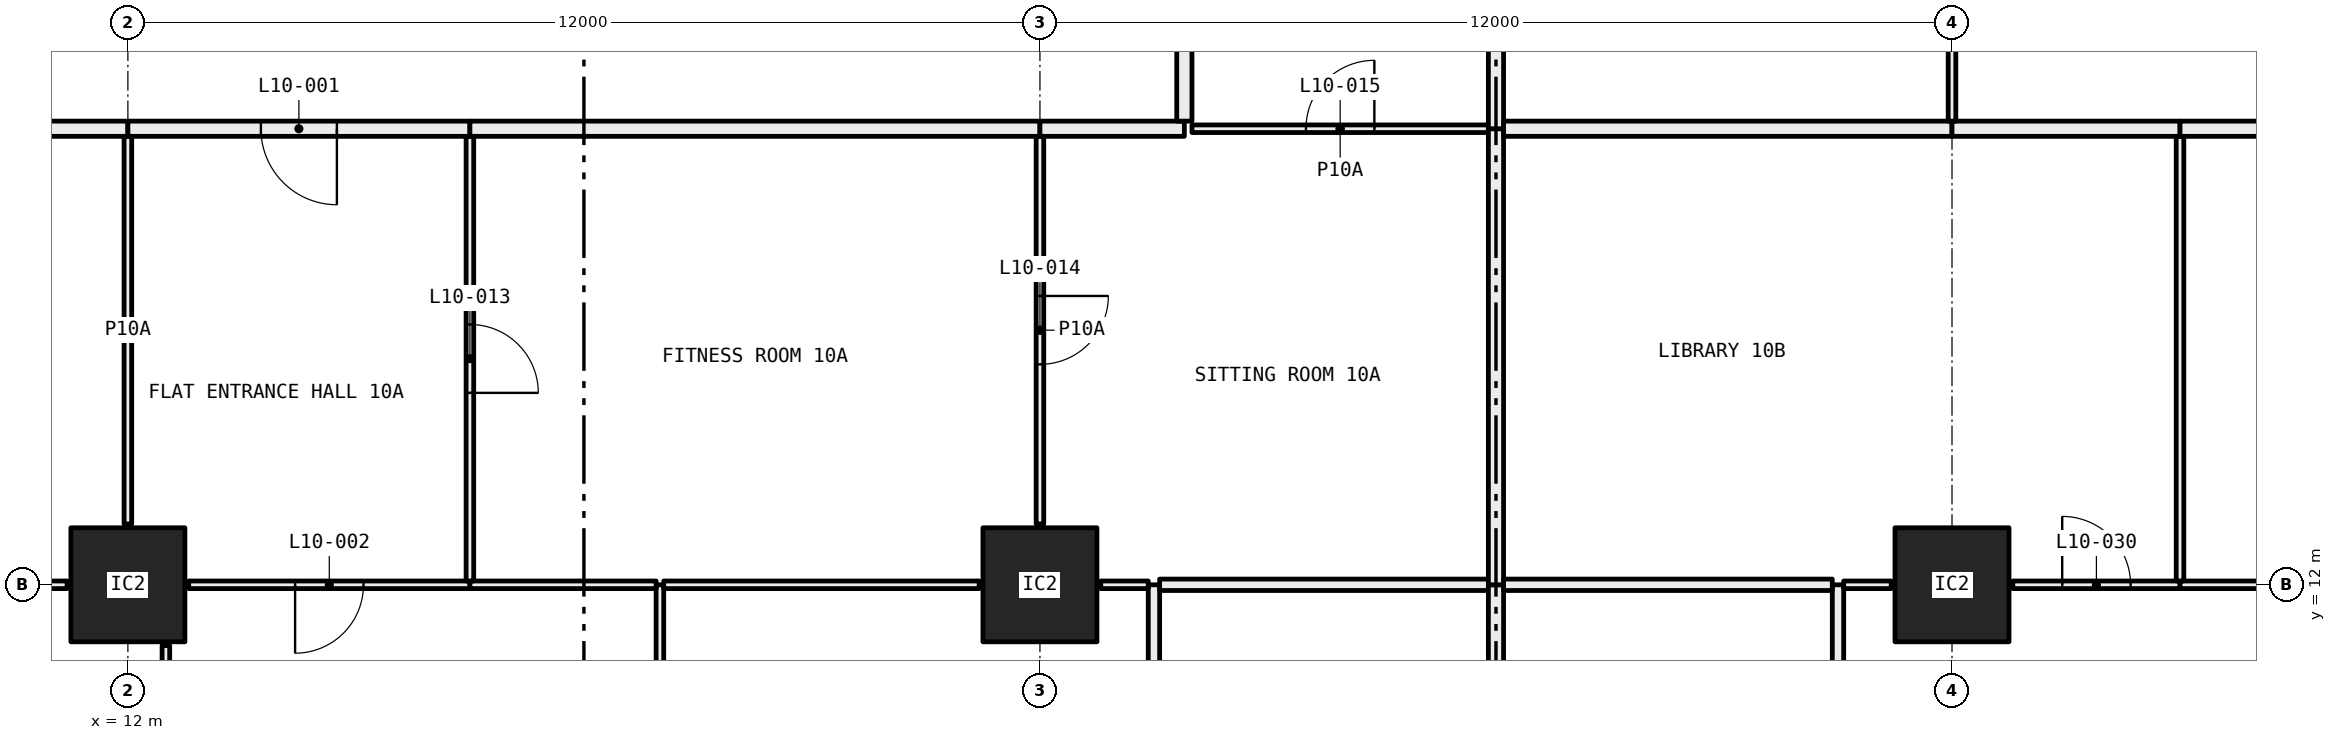
"""IFC4 building model, lengths in metres.
Left out: names, types, materials, properties, quantities, classifications, styles, units other than length and angle.
Written with IfcOpenShell. Run it as: python <this file> out.ifc"""

import sys

from ifc_helpers import new_model, si_unit, direction, frame, frame_2d, origin, origin_2d, place, context, subcontext, project, spatial, rectangle, hollow_rectangle, extrude, element, fill, save


model = new_model("IFC4")
c1 = context("Model", 3, precision=1e-05, world=origin(), true_north=direction((0.0, 1.0)))
c2 = subcontext(c1, "Body", "Model", "MODEL_VIEW")
j1 = project(units=[si_unit("LENGTHUNIT", "METRE"), si_unit("PLANEANGLEUNIT", "RADIAN")], contexts=[c1])
p1 = place(None, origin())
s1 = spatial("IfcSite", under=j1, at=p1, CompositionType="ELEMENT")
p2 = place(p1, origin())
s2 = spatial("IfcBuilding", under=s1, at=p2, CompositionType="ELEMENT")
p3 = place(p2, frame((0.0, 0.0, 47.25)))
s3 = spatial("IfcBuildingStorey", under=s2, at=p3, CompositionType="ELEMENT", Elevation=47.25)
for number, where, z_axis, x_axis in (
    (1, (12.0, 12.0, 0.0), (0.0, 0.0, 1.0), (1.0, 0.0, 0.0)),
    (2, (24.0, 12.0, 0.0), (0.0, 0.0, 1.0), (1.0, 0.0, 0.0)),
    (3, (36.0, 12.0, 0.0), (0.0, 0.0, 1.0), (1.0, 0.0, 0.0)),
):
    element("IfcColumn", number, at=place(p3, frame(where, z_axis=z_axis, x_axis=x_axis)), inside=s3, PredefinedType="COLUMN", context=c2, shape_type="SweptSolid", body=[
        extrude(hollow_rectangle(XDim=1.5, YDim=1.5, WallThickness=0.065, at=origin_2d()), origin(), (0.0, 0.0, 1.0), 3.05),
    ])
p4 = place(p3, frame((12.5, 6.05, 0.0), z_axis=(0.0, 0.0, 1.0), x_axis=(0.0, 1.0, 0.0)))
e4 = element("IfcWall", 4, at=p4, inside=s3, PredefinedType="PARTITIONING", context=c2, shape_type="SweptSolid", body=[
    extrude(rectangle(XDim=5.15, YDim=0.1, at=frame_2d((2.575, 0.0))), origin(), (0.0, 0.0, 1.0), 3.05),
])
p5 = place(p4, frame((2.125, 0.0, 0.0)))
e5 = element("IfcOpeningElement", 5, at=p5, cuts=e4, PredefinedType="OPENING", context=c2, shape_type="SweptSolid", body=[
    extrude(rectangle(XDim=0.9, YDim=2.1, at=frame_2d((0.45, 1.05))), frame((0.0, 0.06, 0.0), z_axis=(0.0, -1.0, 0.0), x_axis=(1.0, 0.0, 0.0)), (0.0, 0.0, 1.0), 0.12),
])
p6 = place(p3, frame((11.2, 12.0, 0.0), z_axis=(0.0, 0.0, 1.0), x_axis=(-1.0, 0.0, 0.0)))
e6 = element("IfcWall", 6, at=p6, inside=s3, PredefinedType="PARTITIONING", context=c2, shape_type="SweptSolid", body=[
    extrude(rectangle(XDim=5.15, YDim=0.1, at=frame_2d((2.575, 0.0))), origin(), (0.0, 0.0, 1.0), 2.45),
])
p7 = place(p6, frame((2.125, 0.0, 0.0)))
e7 = element("IfcOpeningElement", 7, at=p7, cuts=e6, PredefinedType="OPENING", context=c2, shape_type="SweptSolid", body=[
    extrude(rectangle(XDim=0.9, YDim=2.1, at=frame_2d((0.45, 1.05))), frame((0.0, 0.06, 0.0), z_axis=(0.0, -1.0, 0.0), x_axis=(1.0, 0.0, 0.0)), (0.0, 0.0, 1.0), 0.12),
])
p8 = place(p3, frame((19.0, 6.05, 0.0), z_axis=(0.0, 0.0, 1.0), x_axis=(0.0, 1.0, 0.0)))
e8 = element("IfcWall", 8, at=p8, inside=s3, PredefinedType="PARTITIONING", context=c2, shape_type="SweptSolid", body=[
    extrude(rectangle(XDim=5.95, YDim=0.1, at=frame_2d((2.975, 0.0))), origin(), (0.0, 0.0, 1.0), 2.45),
])
p9 = place(p8, frame((2.525, 0.0, 0.0)))
e9 = element("IfcOpeningElement", 9, at=p9, cuts=e8, PredefinedType="OPENING", context=c2, shape_type="SweptSolid", body=[
    extrude(rectangle(XDim=0.9, YDim=2.1, at=frame_2d((0.45, 1.05))), frame((0.0, 0.06, 0.0), z_axis=(0.0, -1.0, 0.0), x_axis=(1.0, 0.0, 0.0)), (0.0, 0.0, 1.0), 0.12),
])
p10 = place(p3, frame((16.5, 12.0, 0.0), z_axis=(0.0, 0.0, 1.0), x_axis=(-1.0, 0.0, 0.0)))
e10 = element("IfcWall", 10, at=p10, inside=s3, PredefinedType="PARTITIONING", context=c2, shape_type="SweptSolid", body=[
    extrude(rectangle(XDim=3.7, YDim=0.1, at=frame_2d((1.85, 0.0))), origin(), (0.0, 0.0, 1.0), 2.45),
])
p11 = place(p10, frame((1.4, 0.0, 0.0)))
e11 = element("IfcOpeningElement", 11, at=p11, cuts=e10, PredefinedType="OPENING", context=c2, shape_type="SweptSolid", body=[
    extrude(rectangle(XDim=0.9, YDim=2.1, at=frame_2d((0.45, 1.05))), frame((0.0, 0.06, 0.0), z_axis=(0.0, -1.0, 0.0), x_axis=(1.0, 0.0, 0.0)), (0.0, 0.0, 1.0), 0.12),
])
p12 = place(p3, frame((18.95, 12.0, 0.0), z_axis=(0.0, 0.0, 1.0), x_axis=(-1.0, 0.0, 0.0)))
e12 = element("IfcWall", 12, at=p12, inside=s3, PredefinedType="PARTITIONING", context=c2, shape_type="SweptSolid", body=[
    extrude(rectangle(XDim=2.45, YDim=0.1, at=frame_2d((1.225, 0.0))), origin(), (0.0, 0.0, 1.0), 2.45),
])
p13 = place(p3, frame((25.5, 9.0, 0.0), z_axis=(0.0, 0.0, 1.0), x_axis=(0.0, 1.0, 0.0)))
e13 = element("IfcWall", 13, at=p13, inside=s3, PredefinedType="PARTITIONING", context=c2, shape_type="SweptSolid", body=[
    extrude(rectangle(XDim=3.0, YDim=0.15, at=frame_2d((1.5, 0.0))), origin(), (0.0, 0.0, 1.0), 2.45),
])
p14 = place(p13, frame((1.05, 0.0, 0.0)))
e14 = element("IfcOpeningElement", 14, at=p14, cuts=e13, PredefinedType="OPENING", context=c2, shape_type="SweptSolid", body=[
    extrude(rectangle(XDim=0.9, YDim=2.1, at=frame_2d((0.45, 1.05))), frame((0.0, 0.085, 0.0), z_axis=(0.0, -1.0, 0.0), x_axis=(1.0, 0.0, 0.0)), (0.0, 0.0, 1.0), 0.17),
])
p15 = place(p3, frame((23.2, 12.0, 0.0), z_axis=(0.0, 0.0, 1.0), x_axis=(-1.0, 0.0, 0.0)))
e15 = element("IfcWall", 15, at=p15, inside=s3, PredefinedType="PARTITIONING", context=c2, shape_type="SweptSolid", body=[
    extrude(rectangle(XDim=4.15, YDim=0.1, at=frame_2d((2.075, 0.0))), origin(), (0.0, 0.0, 1.0), 2.45),
])
p16 = place(p3, frame((25.425, 12.0, 0.0), z_axis=(0.0, 0.0, 1.0), x_axis=(-1.0, 0.0, 0.0)))
e16 = element("IfcWall", 16, at=p16, inside=s3, PredefinedType="PARTITIONING", context=c2, shape_type="SweptSolid", body=[
    extrude(rectangle(XDim=0.625, YDim=0.1, at=frame_2d((0.312, 0.0))), origin(), (0.0, 0.0, 1.0), 2.45),
])
p17 = place(p3, frame((29.9, 12.0, 0.0), z_axis=(0.0, 0.0, 1.0), x_axis=(-1.0, 0.0, 0.0)))
e17 = element("IfcWall", 17, at=p17, inside=s3, PredefinedType="PARTITIONING", context=c2, shape_type="SweptSolid", body=[
    extrude(rectangle(XDim=4.325, YDim=0.15, at=frame_2d((2.163, 0.0))), origin(), (0.0, 0.0, 1.0), 2.45),
])
p18 = place(p3, frame((30.0, 9.0, 0.0), z_axis=(0.0, 0.0, 1.0), x_axis=(0.0, 1.0, 0.0)))
e18 = element("IfcWall", 18, at=p18, inside=s3, PredefinedType="PARTITIONING", context=c2, shape_type="SweptSolid", body=[
    extrude(rectangle(XDim=3.0, YDim=0.2, at=frame_2d((1.5, 0.0))), origin(), (0.0, 0.0, 1.0), 2.45),
])
p19 = place(p3, frame((12.0, 12.8, 0.0), z_axis=(0.0, 0.0, 1.0), x_axis=(0.0, 1.0, 0.0)))
e19 = element("IfcWall", 19, at=p19, inside=s3, PredefinedType="PARTITIONING", context=c2, shape_type="SweptSolid", body=[
    extrude(rectangle(XDim=5.1, YDim=0.1, at=frame_2d((2.55, 0.0))), origin(), (0.0, 0.0, 1.0), 3.05),
])
p20 = place(p3, frame((12.0, 18.0, 0.0), z_axis=(0.0, 0.0, 1.0), x_axis=(-1.0, 0.0, 0.0)))
e20 = element("IfcWall", 20, at=p20, inside=s3, PredefinedType="PARTITIONING", context=c2, shape_type="SweptSolid", body=[
    extrude(rectangle(XDim=1.9, YDim=0.2, at=frame_2d((0.95, 0.0))), origin(), (0.0, 0.0, 1.0), 3.05),
])
p21 = place(p3, frame((16.5, 12.05, 0.0), z_axis=(0.0, 0.0, 1.0), x_axis=(0.0, 1.0, 0.0)))
e21 = element("IfcWall", 21, at=p21, inside=s3, PredefinedType="PARTITIONING", context=c2, shape_type="SweptSolid", body=[
    extrude(rectangle(XDim=5.85, YDim=0.1, at=frame_2d((2.925, 0.0))), origin(), (0.0, 0.0, 1.0), 2.45),
])
p22 = place(p21, frame((2.475, 0.0, 0.0)))
e22 = element("IfcOpeningElement", 22, at=p22, cuts=e21, PredefinedType="OPENING", context=c2, shape_type="SweptSolid", body=[
    extrude(rectangle(XDim=0.9, YDim=2.1, at=frame_2d((0.45, 1.05))), frame((0.0, 0.06, 0.0), z_axis=(0.0, -1.0, 0.0), x_axis=(1.0, 0.0, 0.0)), (0.0, 0.0, 1.0), 0.12),
])
p23 = place(p3, frame((16.5, 18.0, 0.0), z_axis=(0.0, 0.0, 1.0), x_axis=(-1.0, 0.0, 0.0)))
e23 = element("IfcWall", 23, at=p23, inside=s3, PredefinedType="PARTITIONING", context=c2, shape_type="SweptSolid", body=[
    extrude(rectangle(XDim=4.5, YDim=0.2, at=frame_2d((2.25, 0.0))), origin(), (0.0, 0.0, 1.0), 3.05),
])
p24 = place(p23, frame((1.75, 0.0, 0.0)))
e24 = element("IfcOpeningElement", 24, at=p24, cuts=e23, PredefinedType="OPENING", context=c2, shape_type="SweptSolid", body=[
    extrude(rectangle(XDim=1.0, YDim=2.1, at=frame_2d((0.5, 1.05))), frame((0.0, 0.11, 0.0), z_axis=(0.0, -1.0, 0.0), x_axis=(1.0, 0.0, 0.0)), (0.0, 0.0, 1.0), 0.22),
])
p25 = place(p3, frame((24.0, 12.8, 0.0), z_axis=(0.0, 0.0, 1.0), x_axis=(0.0, 1.0, 0.0)))
e25 = element("IfcWall", 25, at=p25, inside=s3, PredefinedType="PARTITIONING", context=c2, shape_type="SweptSolid", body=[
    extrude(rectangle(XDim=5.1, YDim=0.1, at=frame_2d((2.55, 0.0))), origin(), (0.0, 0.0, 1.0), 3.05),
])
p26 = place(p25, frame((2.1, 0.0, 0.0)))
e26 = element("IfcOpeningElement", 26, at=p26, cuts=e25, PredefinedType="OPENING", context=c2, shape_type="SweptSolid", body=[
    extrude(rectangle(XDim=0.9, YDim=2.1, at=frame_2d((0.45, 1.05))), frame((0.0, 0.06, 0.0), z_axis=(0.0, -1.0, 0.0), x_axis=(1.0, 0.0, 0.0)), (0.0, 0.0, 1.0), 0.12),
])
p27 = place(p3, frame((24.0, 18.0, 0.0), z_axis=(0.0, 0.0, 1.0), x_axis=(-1.0, 0.0, 0.0)))
e27 = element("IfcWall", 27, at=p27, inside=s3, PredefinedType="PARTITIONING", context=c2, shape_type="SweptSolid", body=[
    extrude(rectangle(XDim=7.5, YDim=0.2, at=frame_2d((3.75, 0.0))), origin(), (0.0, 0.0, 1.0), 3.05),
])
p28 = place(p3, frame((29.9, 18.0, 0.0), z_axis=(0.0, 0.0, 1.0), x_axis=(-1.0, 0.0, 0.0)))
e28 = element("IfcWall", 28, at=p28, inside=s3, PredefinedType="PARTITIONING", context=c2, shape_type="SweptSolid", body=[
    extrude(rectangle(XDim=3.9, YDim=0.1, at=frame_2d((1.95, 0.0))), origin(), (0.0, 0.0, 1.0), 3.05),
])
p29 = place(p28, frame((1.5, 0.0, 0.0)))
e29 = element("IfcOpeningElement", 29, at=p29, cuts=e28, PredefinedType="OPENING", context=c2, shape_type="SweptSolid", body=[
    extrude(rectangle(XDim=0.9, YDim=2.1, at=frame_2d((0.45, 1.05))), frame((0.0, 0.06, 0.0), z_axis=(0.0, -1.0, 0.0), x_axis=(1.0, 0.0, 0.0)), (0.0, 0.0, 1.0), 0.12),
])
p30 = place(p3, frame((30.0, 12.0, 0.0), z_axis=(0.0, 0.0, 1.0), x_axis=(0.0, 1.0, 0.0)))
e30 = element("IfcWall", 30, at=p30, inside=s3, PredefinedType="PARTITIONING", context=c2, shape_type="SweptSolid", body=[
    extrude(rectangle(XDim=6.0, YDim=0.2, at=frame_2d((3.0, 0.0))), origin(), (0.0, 0.0, 1.0), 2.45),
])
p31 = place(p3, frame((25.9, 18.0, 0.0), z_axis=(0.0, 0.0, 1.0), x_axis=(-1.0, 0.0, 0.0)))
e31 = element("IfcWall", 31, at=p31, inside=s3, PredefinedType="PARTITIONING", context=c2, shape_type="SweptSolid", body=[
    extrude(rectangle(XDim=1.9, YDim=0.2, at=frame_2d((0.95, 0.0))), origin(), (0.0, 0.0, 1.0), 3.05),
])
p32 = place(p3, frame((30.0, 18.0, 0.0), z_axis=(0.0, 0.0, 1.0), x_axis=(0.0, 1.0, 0.0)))
e32 = element("IfcWall", 32, at=p32, inside=s3, PredefinedType="PARTITIONING", context=c2, shape_type="SweptSolid", body=[
    extrude(rectangle(XDim=6.3, YDim=0.2, at=frame_2d((3.15, 0.0))), origin(), (0.0, 0.0, 1.0), 2.45),
])
p33 = place(p3, frame((25.9, 23.9, 0.0), z_axis=(0.0, 0.0, 1.0), x_axis=(0.0, -1.0, 0.0)))
e33 = element("IfcWall", 33, at=p33, inside=s3, PredefinedType="PARTITIONING", context=c2, shape_type="SweptSolid", body=[
    extrude(rectangle(XDim=5.8, YDim=0.2, at=frame_2d((2.9, 0.0))), origin(), (0.0, 0.0, 1.0), 3.05),
])
p34 = place(p3, frame((34.5, 9.075, 0.0), z_axis=(0.0, 0.0, 1.0), x_axis=(0.0, 1.0, 0.0)))
e34 = element("IfcWall", 34, at=p34, inside=s3, PredefinedType="PARTITIONING", context=c2, shape_type="SweptSolid", body=[
    extrude(rectangle(XDim=2.925, YDim=0.15, at=frame_2d((1.462, 0.0))), origin(), (0.0, 0.0, 1.0), 2.45),
])
p35 = place(p34, frame((1.012, 0.0, 0.0)))
e35 = element("IfcOpeningElement", 35, at=p35, cuts=e34, PredefinedType="OPENING", context=c2, shape_type="SweptSolid", body=[
    extrude(rectangle(XDim=0.9, YDim=2.1, at=frame_2d((0.45, 1.05))), frame((0.0, 0.085, 0.0), z_axis=(0.0, -1.0, 0.0), x_axis=(1.0, 0.0, 0.0)), (0.0, 0.0, 1.0), 0.17),
])
p36 = place(p3, frame((34.425, 12.0, 0.0), z_axis=(0.0, 0.0, 1.0), x_axis=(-1.0, 0.0, 0.0)))
e36 = element("IfcWall", 36, at=p36, inside=s3, PredefinedType="PARTITIONING", context=c2, shape_type="SweptSolid", body=[
    extrude(rectangle(XDim=4.325, YDim=0.15, at=frame_2d((2.163, 0.0))), origin(), (0.0, 0.0, 1.0), 2.45),
])
p37 = place(p3, frame((35.2, 12.0, 0.0), z_axis=(0.0, 0.0, 1.0), x_axis=(-1.0, 0.0, 0.0)))
e37 = element("IfcWall", 37, at=p37, inside=s3, PredefinedType="PARTITIONING", context=c2, shape_type="SweptSolid", body=[
    extrude(rectangle(XDim=0.625, YDim=0.1, at=frame_2d((0.312, 0.0))), origin(), (0.0, 0.0, 1.0), 2.45),
])
p38 = place(p3, frame((39.0, 12.0, 0.0), z_axis=(0.0, 0.0, 1.0), x_axis=(-1.0, 0.0, 0.0)))
e38 = element("IfcWall", 38, at=p38, inside=s3, PredefinedType="PARTITIONING", context=c2, shape_type="SweptSolid", body=[
    extrude(rectangle(XDim=2.2, YDim=0.1, at=frame_2d((1.1, 0.0))), origin(), (0.0, 0.0, 1.0), 2.45),
])
p39 = place(p38, frame((0.65, 0.0, 0.0)))
e39 = element("IfcOpeningElement", 39, at=p39, cuts=e38, PredefinedType="OPENING", context=c2, shape_type="SweptSolid", body=[
    extrude(rectangle(XDim=0.9, YDim=2.1, at=frame_2d((0.45, 1.05))), frame((0.0, 0.06, 0.0), z_axis=(0.0, -1.0, 0.0), x_axis=(1.0, 0.0, 0.0)), (0.0, 0.0, 1.0), 0.12),
])
p40 = place(p3, frame((42.325, 12.0, 0.0), z_axis=(0.0, 0.0, 1.0), x_axis=(-1.0, 0.0, 0.0)))
e40 = element("IfcWall", 40, at=p40, inside=s3, PredefinedType="PARTITIONING", context=c2, shape_type="SweptSolid", body=[
    extrude(rectangle(XDim=3.325, YDim=0.1, at=frame_2d((1.663, 0.0))), origin(), (0.0, 0.0, 1.0), 2.45),
])
p41 = place(p40, frame((1.212, 0.0, 0.0)))
e41 = element("IfcOpeningElement", 41, at=p41, cuts=e40, PredefinedType="OPENING", context=c2, shape_type="SweptSolid", body=[
    extrude(rectangle(XDim=0.9, YDim=2.1, at=frame_2d((0.45, 1.05))), frame((0.0, 0.06, 0.0), z_axis=(0.0, -1.0, 0.0), x_axis=(1.0, 0.0, 0.0)), (0.0, 0.0, 1.0), 0.12),
])
p42 = place(p3, frame((39.0, 12.05, 0.0), z_axis=(0.0, 0.0, 1.0), x_axis=(0.0, 1.0, 0.0)))
e42 = element("IfcWall", 42, at=p42, inside=s3, PredefinedType="PARTITIONING", context=c2, shape_type="SweptSolid", body=[
    extrude(rectangle(XDim=5.85, YDim=0.1, at=frame_2d((2.925, 0.0))), origin(), (0.0, 0.0, 1.0), 2.45),
])
p43 = place(p3, frame((36.0, 18.0, 0.0), z_axis=(0.0, 0.0, 1.0), x_axis=(-1.0, 0.0, 0.0)))
e43 = element("IfcWall", 43, at=p43, inside=s3, PredefinedType="PARTITIONING", context=c2, shape_type="SweptSolid", body=[
    extrude(rectangle(XDim=5.9, YDim=0.2, at=frame_2d((2.95, 0.0))), origin(), (0.0, 0.0, 1.0), 2.45),
])
p44 = place(p3, frame((39.0, 18.0, 0.0), z_axis=(0.0, 0.0, 1.0), x_axis=(-1.0, 0.0, 0.0)))
e44 = element("IfcWall", 44, at=p44, inside=s3, PredefinedType="PARTITIONING", context=c2, shape_type="SweptSolid", body=[
    extrude(rectangle(XDim=3.0, YDim=0.2, at=frame_2d((1.5, 0.0))), origin(), (0.0, 0.0, 1.0), 2.45),
])
p45 = place(p3, frame((43.5, 18.0, 0.0), z_axis=(0.0, 0.0, 1.0), x_axis=(-1.0, 0.0, 0.0)))
e45 = element("IfcWall", 45, at=p45, inside=s3, PredefinedType="PARTITIONING", context=c2, shape_type="SweptSolid", body=[
    extrude(rectangle(XDim=4.5, YDim=0.2, at=frame_2d((2.25, 0.0))), origin(), (0.0, 0.0, 1.0), 3.05),
])
p46 = place(p3, frame((36.0, 18.1, 0.0), z_axis=(0.0, 0.0, 1.0), x_axis=(0.0, 1.0, 0.0)))
e46 = element("IfcWall", 46, at=p46, inside=s3, PredefinedType="PARTITIONING", context=c2, shape_type="SweptSolid", body=[
    extrude(rectangle(XDim=5.1, YDim=0.1, at=frame_2d((2.55, 0.0))), origin(), (0.0, 0.0, 1.0), 2.45),
])
p47 = place(p46, frame((2.1, 0.0, 0.0)))
e47 = element("IfcOpeningElement", 47, at=p47, cuts=e46, PredefinedType="OPENING", context=c2, shape_type="SweptSolid", body=[
    extrude(rectangle(XDim=0.9, YDim=2.1, at=frame_2d((0.45, 1.05))), frame((0.0, 0.06, 0.0), z_axis=(0.0, -1.0, 0.0), x_axis=(1.0, 0.0, 0.0)), (0.0, 0.0, 1.0), 0.12),
])
p48 = place(p24, origin())
e48 = element("IfcDoor", 48, at=p48, inside=s3, OperationType="SINGLE_SWING_RIGHT", PredefinedType="DOOR", context=c2, shape_type="SweptSolid", body=[
    extrude(rectangle(XDim=1.0, YDim=2.1, at=frame_2d((0.5, 1.05))), frame((0.0, 0.025, 0.0), z_axis=(0.0, -1.0, 0.0), x_axis=(1.0, 0.0, 0.0)), (0.0, 0.0, 1.0), 0.05),
])
fill(e24, e48)
p49 = place(p11, origin())
e49 = element("IfcDoor", 49, at=p49, inside=s3, OperationType="SINGLE_SWING_LEFT", PredefinedType="DOOR", context=c2, shape_type="SweptSolid", body=[
    extrude(rectangle(XDim=0.9, YDim=2.1, at=frame_2d((0.45, 1.05))), frame((0.0, 0.025, 0.0), z_axis=(0.0, -1.0, 0.0), x_axis=(1.0, 0.0, 0.0)), (0.0, 0.0, 1.0), 0.05),
])
fill(e11, e49)
p50 = place(p22, frame((0.9, 0.0, 0.0), x_axis=(-1.0, 0.0, 0.0)))
e50 = element("IfcDoor", 50, at=p50, inside=s3, OperationType="SINGLE_SWING_LEFT", PredefinedType="DOOR", context=c2, shape_type="SweptSolid", body=[
    extrude(rectangle(XDim=0.9, YDim=2.1, at=frame_2d((0.45, 1.05))), frame((0.0, 0.025, 0.0), z_axis=(0.0, -1.0, 0.0), x_axis=(1.0, 0.0, 0.0)), (0.0, 0.0, 1.0), 0.05),
])
fill(e22, e50)
p51 = place(p26, frame((0.9, 0.0, 0.0), x_axis=(-1.0, 0.0, 0.0)))
e51 = element("IfcDoor", 51, at=p51, inside=s3, OperationType="SINGLE_SWING_RIGHT", PredefinedType="DOOR", context=c2, shape_type="SweptSolid", body=[
    extrude(rectangle(XDim=0.9, YDim=2.1, at=frame_2d((0.45, 1.05))), frame((0.0, 0.025, 0.0), z_axis=(0.0, -1.0, 0.0), x_axis=(1.0, 0.0, 0.0)), (0.0, 0.0, 1.0), 0.05),
])
fill(e26, e51)
p52 = place(p29, frame((0.9, 0.0, 0.0), x_axis=(-1.0, 0.0, 0.0)))
e52 = element("IfcDoor", 52, at=p52, inside=s3, OperationType="SINGLE_SWING_LEFT", PredefinedType="DOOR", context=c2, shape_type="SweptSolid", body=[
    extrude(rectangle(XDim=0.9, YDim=2.1, at=frame_2d((0.45, 1.05))), frame((0.0, 0.025, 0.0), z_axis=(0.0, -1.0, 0.0), x_axis=(1.0, 0.0, 0.0)), (0.0, 0.0, 1.0), 0.05),
])
fill(e29, e52)
p53 = place(p39, frame((0.9, 0.0, 0.0), x_axis=(-1.0, 0.0, 0.0)))
e53 = element("IfcDoor", 53, at=p53, inside=s3, OperationType="SINGLE_SWING_RIGHT", PredefinedType="DOOR", context=c2, shape_type="SweptSolid", body=[
    extrude(rectangle(XDim=0.9, YDim=2.1, at=frame_2d((0.45, 1.05))), frame((0.0, 0.025, 0.0), z_axis=(0.0, -1.0, 0.0), x_axis=(1.0, 0.0, 0.0)), (0.0, 0.0, 1.0), 0.05),
])
fill(e39, e53)
save(model, sys.argv[1])
